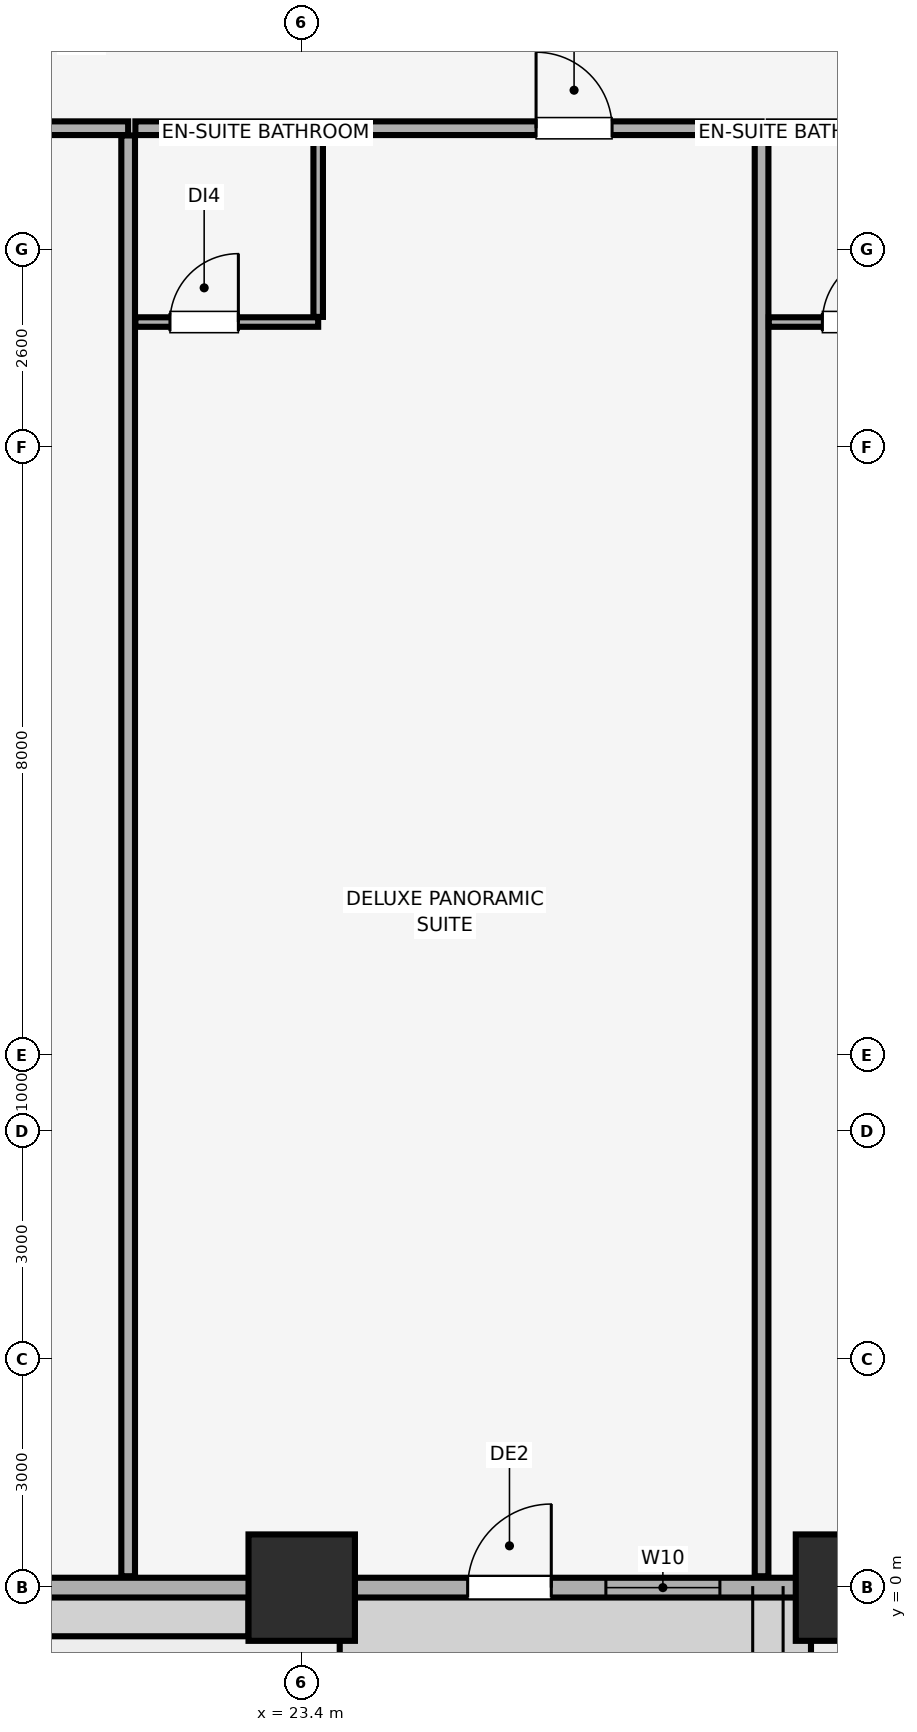
"""IFC4 building model, lengths in metres.
Left out: names, types, materials, properties, quantities, classifications, styles, units other than length and angle.
Written with IfcOpenShell. Run it as: python <this file> out.ifc"""

import sys

from ifc_helpers import new_model, si_unit, direction, frame, frame_2d, origin, origin_2d, place, context, subcontext, project, spatial, rectangle, extrude, element, fill, save


model = new_model("IFC4")
c1 = context("Model", 3, precision=1e-05, world=origin(), true_north=direction((0.0, 1.0)))
c2 = subcontext(c1, "Body", "Model", "MODEL_VIEW")
j1 = project(units=[si_unit("LENGTHUNIT", "METRE"), si_unit("PLANEANGLEUNIT", "RADIAN")], contexts=[c1])
p1 = place(None, origin())
s1 = spatial("IfcSite", under=j1, at=p1, CompositionType="ELEMENT")
p2 = place(p1, origin())
s2 = spatial("IfcBuilding", under=s1, at=p2, CompositionType="ELEMENT")
p3 = place(p2, frame((0.0, 0.0, 76.4)))
s3 = spatial("IfcBuildingStorey", under=s2, at=p3, CompositionType="ELEMENT", Elevation=76.4)
for number, where, z_axis, x_axis in (
    (1, (23.4, 0.0, 0.0), (0.0, 0.0, 1.0), (1.0, 0.0, 0.0)),
    (2, (30.6, 0.0, 0.0), (0.0, 0.0, 1.0), (1.0, 0.0, 0.0)),
):
    element("IfcColumn", number, at=place(p3, frame(where, z_axis=z_axis, x_axis=x_axis)), inside=s3, PredefinedType="COLUMN", context=c2, shape_type="SweptSolid", body=[
        extrude(rectangle(XDim=1.4, YDim=1.4, at=origin_2d()), origin(), (0.0, 0.0, 1.0), 3.4),
    ])
p4 = place(p3, frame((4.2, 0.0, 0.0), z_axis=(0.0, 0.0, 1.0), x_axis=(1.0, 0.0, 0.0)))
e3 = element("IfcWall", 3, at=p4, inside=s3, PredefinedType="SOLIDWALL", context=c2, shape_type="SweptSolid", body=[
    extrude(rectangle(XDim=75.6, YDim=0.26, at=frame_2d((37.8, 0.0))), origin(), (0.0, 0.0, 1.0), 2.45),
])
p5 = place(p4, frame((21.383, 0.0, 0.0)))
e4 = element("IfcOpeningElement", 4, at=p5, cuts=e3, PredefinedType="OPENING", context=c2, shape_type="SweptSolid", body=[
    extrude(rectangle(XDim=1.1, YDim=2.15, at=frame_2d((0.55, 1.075))), frame((0.0, 0.14, 0.0), z_axis=(0.0, -1.0, 0.0), x_axis=(1.0, 0.0, 0.0)), (0.0, 0.0, 1.0), 0.28),
])
p6 = place(p4, frame((37.25, 0.0, 0.0)))
e5 = element("IfcOpeningElement", 5, at=p6, cuts=e3, PredefinedType="OPENING", context=c2, shape_type="SweptSolid", body=[
    extrude(rectangle(XDim=1.1, YDim=2.15, at=frame_2d((0.55, 1.075))), frame((0.0, 0.14, 0.0), z_axis=(0.0, -1.0, 0.0), x_axis=(1.0, 0.0, 0.0)), (0.0, 0.0, 1.0), 0.28),
])
p7 = place(p4, frame((53.117, 0.0, 0.0)))
e6 = element("IfcOpeningElement", 6, at=p7, cuts=e3, PredefinedType="OPENING", context=c2, shape_type="SweptSolid", body=[
    extrude(rectangle(XDim=1.1, YDim=2.15, at=frame_2d((0.55, 1.075))), frame((0.0, 0.14, 0.0), z_axis=(0.0, -1.0, 0.0), x_axis=(1.0, 0.0, 0.0)), (0.0, 0.0, 1.0), 0.28),
])
p8 = place(p4, frame((1.485, 0.0, 0.85)))
e7 = element("IfcOpeningElement", 7, at=p8, cuts=e3, PredefinedType="OPENING", context=c2, shape_type="SweptSolid", body=[
    extrude(rectangle(XDim=1.5, YDim=1.4, at=frame_2d((0.75, 0.7))), frame((0.0, 0.14, 0.0), z_axis=(0.0, -1.0, 0.0), x_axis=(1.0, 0.0, 0.0)), (0.0, 0.0, 1.0), 0.28),
])
p9 = place(p4, frame((6.142, 0.0, 0.85)))
e8 = element("IfcOpeningElement", 8, at=p9, cuts=e3, PredefinedType="OPENING", context=c2, shape_type="SweptSolid", body=[
    extrude(rectangle(XDim=1.5, YDim=1.4, at=frame_2d((0.75, 0.7))), frame((0.0, 0.14, 0.0), z_axis=(0.0, -1.0, 0.0), x_axis=(1.0, 0.0, 0.0)), (0.0, 0.0, 1.0), 0.28),
])
p10 = place(p4, frame((9.342, 0.0, 0.85)))
e9 = element("IfcOpeningElement", 9, at=p10, cuts=e3, PredefinedType="OPENING", context=c2, shape_type="SweptSolid", body=[
    extrude(rectangle(XDim=1.5, YDim=1.4, at=frame_2d((0.75, 0.7))), frame((0.0, 0.14, 0.0), z_axis=(0.0, -1.0, 0.0), x_axis=(1.0, 0.0, 0.0)), (0.0, 0.0, 1.0), 0.28),
])
p11 = place(p4, frame((13.908, 0.0, 0.85)))
e10 = element("IfcOpeningElement", 10, at=p11, cuts=e3, PredefinedType="OPENING", context=c2, shape_type="SweptSolid", body=[
    extrude(rectangle(XDim=1.5, YDim=1.4, at=frame_2d((0.75, 0.7))), frame((0.0, 0.14, 0.0), z_axis=(0.0, -1.0, 0.0), x_axis=(1.0, 0.0, 0.0)), (0.0, 0.0, 1.0), 0.28),
])
p12 = place(p4, frame((23.202, 0.0, 0.85)))
e11 = element("IfcOpeningElement", 11, at=p12, cuts=e3, PredefinedType="OPENING", context=c2, shape_type="SweptSolid", body=[
    extrude(rectangle(XDim=1.5, YDim=1.4, at=frame_2d((0.75, 0.7))), frame((0.0, 0.14, 0.0), z_axis=(0.0, -1.0, 0.0), x_axis=(1.0, 0.0, 0.0)), (0.0, 0.0, 1.0), 0.28),
])
p13 = place(p4, frame((29.25, 0.0, 0.85)))
e12 = element("IfcOpeningElement", 12, at=p13, cuts=e3, PredefinedType="OPENING", context=c2, shape_type="SweptSolid", body=[
    extrude(rectangle(XDim=1.5, YDim=1.4, at=frame_2d((0.75, 0.7))), frame((0.0, 0.14, 0.0), z_axis=(0.0, -1.0, 0.0), x_axis=(1.0, 0.0, 0.0)), (0.0, 0.0, 1.0), 0.28),
])
p14 = place(p4, frame((34.79, 0.0, 0.85)))
e13 = element("IfcOpeningElement", 13, at=p14, cuts=e3, PredefinedType="OPENING", context=c2, shape_type="SweptSolid", body=[
    extrude(rectangle(XDim=1.5, YDim=1.4, at=frame_2d((0.75, 0.7))), frame((0.0, 0.14, 0.0), z_axis=(0.0, -1.0, 0.0), x_axis=(1.0, 0.0, 0.0)), (0.0, 0.0, 1.0), 0.28),
])
p15 = place(p4, frame((39.31, 0.0, 0.85)))
e14 = element("IfcOpeningElement", 14, at=p15, cuts=e3, PredefinedType="OPENING", context=c2, shape_type="SweptSolid", body=[
    extrude(rectangle(XDim=1.5, YDim=1.4, at=frame_2d((0.75, 0.7))), frame((0.0, 0.14, 0.0), z_axis=(0.0, -1.0, 0.0), x_axis=(1.0, 0.0, 0.0)), (0.0, 0.0, 1.0), 0.28),
])
p16 = place(p4, frame((44.85, 0.0, 0.85)))
e15 = element("IfcOpeningElement", 15, at=p16, cuts=e3, PredefinedType="OPENING", context=c2, shape_type="SweptSolid", body=[
    extrude(rectangle(XDim=1.5, YDim=1.4, at=frame_2d((0.75, 0.7))), frame((0.0, 0.14, 0.0), z_axis=(0.0, -1.0, 0.0), x_axis=(1.0, 0.0, 0.0)), (0.0, 0.0, 1.0), 0.28),
])
p17 = place(p4, frame((50.848, 0.0, 0.85)))
e16 = element("IfcOpeningElement", 16, at=p17, cuts=e3, PredefinedType="OPENING", context=c2, shape_type="SweptSolid", body=[
    extrude(rectangle(XDim=1.5, YDim=1.4, at=frame_2d((0.75, 0.7))), frame((0.0, 0.14, 0.0), z_axis=(0.0, -1.0, 0.0), x_axis=(1.0, 0.0, 0.0)), (0.0, 0.0, 1.0), 0.28),
])
p18 = place(p4, frame((60.142, 0.0, 0.85)))
e17 = element("IfcOpeningElement", 17, at=p18, cuts=e3, PredefinedType="OPENING", context=c2, shape_type="SweptSolid", body=[
    extrude(rectangle(XDim=1.5, YDim=1.4, at=frame_2d((0.75, 0.7))), frame((0.0, 0.14, 0.0), z_axis=(0.0, -1.0, 0.0), x_axis=(1.0, 0.0, 0.0)), (0.0, 0.0, 1.0), 0.28),
])
p19 = place(p4, frame((64.708, 0.0, 0.85)))
e18 = element("IfcOpeningElement", 18, at=p19, cuts=e3, PredefinedType="OPENING", context=c2, shape_type="SweptSolid", body=[
    extrude(rectangle(XDim=1.5, YDim=1.4, at=frame_2d((0.75, 0.7))), frame((0.0, 0.14, 0.0), z_axis=(0.0, -1.0, 0.0), x_axis=(1.0, 0.0, 0.0)), (0.0, 0.0, 1.0), 0.28),
])
p20 = place(p4, frame((67.908, 0.0, 0.85)))
e19 = element("IfcOpeningElement", 19, at=p20, cuts=e3, PredefinedType="OPENING", context=c2, shape_type="SweptSolid", body=[
    extrude(rectangle(XDim=1.5, YDim=1.4, at=frame_2d((0.75, 0.7))), frame((0.0, 0.14, 0.0), z_axis=(0.0, -1.0, 0.0), x_axis=(1.0, 0.0, 0.0)), (0.0, 0.0, 1.0), 0.28),
])
p21 = place(p4, frame((72.615, 0.0, 0.85)))
e20 = element("IfcOpeningElement", 20, at=p21, cuts=e3, PredefinedType="OPENING", context=c2, shape_type="SweptSolid", body=[
    extrude(rectangle(XDim=1.5, YDim=1.4, at=frame_2d((0.75, 0.7))), frame((0.0, 0.14, 0.0), z_axis=(0.0, -1.0, 0.0), x_axis=(1.0, 0.0, 0.0)), (0.0, 0.0, 1.0), 0.28),
])
p22 = place(p3, frame((12.878, 19.2, 0.0), z_axis=(0.0, 0.0, 1.0), x_axis=(1.0, 0.0, 0.0)))
e21 = element("IfcWall", 21, at=p22, inside=s3, PredefinedType="PARTITIONING", context=c2, shape_type="SweptSolid", body=[
    extrude(rectangle(XDim=8.238, YDim=0.18, at=frame_2d((4.119, 0.0))), origin(), (0.0, 0.0, 1.0), 3.4),
])
p23 = place(p22, frame((5.67, 0.0, 0.0)))
e22 = element("IfcOpeningElement", 22, at=p23, cuts=e21, PredefinedType="OPENING", context=c2, shape_type="SweptSolid", body=[
    extrude(rectangle(XDim=1.0, YDim=2.15, at=frame_2d((0.5, 1.075))), frame((0.0, 0.1, 0.0), z_axis=(0.0, -1.0, 0.0), x_axis=(1.0, 0.0, 0.0)), (0.0, 0.0, 1.0), 0.2),
])
p24 = place(p3, frame((21.117, 0.15, 0.0), z_axis=(0.0, 0.0, 1.0), x_axis=(0.0, 1.0, 0.0)))
e23 = element("IfcWall", 23, at=p24, inside=s3, PredefinedType="PARTITIONING", context=c2, shape_type="SweptSolid", body=[
    extrude(rectangle(XDim=18.955, YDim=0.18, at=frame_2d((9.478, 0.0))), origin(), (0.0, 0.0, 1.0), 3.4),
])
p25 = place(p3, frame((21.212, 19.2, 0.0), z_axis=(0.0, 0.0, 1.0), x_axis=(1.0, 0.0, 0.0)))
e24 = element("IfcWall", 24, at=p25, inside=s3, PredefinedType="PARTITIONING", context=c2, shape_type="SweptSolid", body=[
    extrude(rectangle(XDim=8.238, YDim=0.18, at=frame_2d((4.119, 0.0))), origin(), (0.0, 0.0, 1.0), 3.4),
])
p26 = place(p25, frame((5.271, 0.0, 0.0)))
e25 = element("IfcOpeningElement", 25, at=p26, cuts=e24, PredefinedType="OPENING", context=c2, shape_type="SweptSolid", body=[
    extrude(rectangle(XDim=1.0, YDim=2.15, at=frame_2d((0.5, 1.075))), frame((0.0, 0.1, 0.0), z_axis=(0.0, -1.0, 0.0), x_axis=(1.0, 0.0, 0.0)), (0.0, 0.0, 1.0), 0.2),
])
p27 = place(p3, frame((29.45, 0.15, 0.0), z_axis=(0.0, 0.0, 1.0), x_axis=(0.0, 1.0, 0.0)))
e26 = element("IfcWall", 26, at=p27, inside=s3, PredefinedType="PARTITIONING", context=c2, shape_type="SweptSolid", body=[
    extrude(rectangle(XDim=18.955, YDim=0.18, at=frame_2d((9.478, 0.0))), origin(), (0.0, 0.0, 1.0), 3.4),
])
p28 = place(p3, frame((21.212, 16.65, 0.0), z_axis=(0.0, 0.0, 1.0), x_axis=(1.0, 0.0, 0.0)))
e27 = element("IfcWall", 27, at=p28, inside=s3, PredefinedType="PARTITIONING", context=c2, shape_type="SweptSolid", body=[
    extrude(rectangle(XDim=2.405, YDim=0.125, at=frame_2d((1.203, 0.0))), origin(), (0.0, 0.0, 1.0), 3.4),
])
p29 = place(p28, frame((0.455, 0.0, 0.0)))
e28 = element("IfcOpeningElement", 28, at=p29, cuts=e27, PredefinedType="OPENING", context=c2, shape_type="SweptSolid", body=[
    extrude(rectangle(XDim=0.9, YDim=2.1, at=frame_2d((0.45, 1.05))), frame((0.0, 0.073, 0.0), z_axis=(0.0, -1.0, 0.0), x_axis=(1.0, 0.0, 0.0)), (0.0, 0.0, 1.0), 0.145),
])
p30 = place(p3, frame((23.617, 16.718, 0.0), z_axis=(0.0, 0.0, 1.0), x_axis=(0.0, 1.0, 0.0)))
e29 = element("IfcWall", 29, at=p30, inside=s3, PredefinedType="PARTITIONING", context=c2, shape_type="SweptSolid", body=[
    extrude(rectangle(XDim=2.387, YDim=0.125, at=frame_2d((1.194, 0.0))), origin(), (0.0, 0.0, 1.0), 2.9),
])
p31 = place(p3, frame((29.545, 19.2, 0.0), z_axis=(0.0, 0.0, 1.0), x_axis=(1.0, 0.0, 0.0)))
e30 = element("IfcWall", 30, at=p31, inside=s3, PredefinedType="PARTITIONING", context=c2, shape_type="SweptSolid", body=[
    extrude(rectangle(XDim=8.238, YDim=0.18, at=frame_2d((4.119, 0.0))), origin(), (0.0, 0.0, 1.0), 3.4),
])
p32 = place(p31, frame((4.89, 0.0, 0.0)))
e31 = element("IfcOpeningElement", 31, at=p32, cuts=e30, PredefinedType="OPENING", context=c2, shape_type="SweptSolid", body=[
    extrude(rectangle(XDim=1.0, YDim=2.15, at=frame_2d((0.5, 1.075))), frame((0.0, 0.1, 0.0), z_axis=(0.0, -1.0, 0.0), x_axis=(1.0, 0.0, 0.0)), (0.0, 0.0, 1.0), 0.2),
])
p33 = place(p3, frame((29.545, 16.65, 0.0), z_axis=(0.0, 0.0, 1.0), x_axis=(1.0, 0.0, 0.0)))
e32 = element("IfcWall", 32, at=p33, inside=s3, PredefinedType="PARTITIONING", context=c2, shape_type="SweptSolid", body=[
    extrude(rectangle(XDim=2.405, YDim=0.125, at=frame_2d((1.203, 0.0))), origin(), (0.0, 0.0, 1.0), 3.4),
])
p34 = place(p33, frame((0.705, 0.0, 0.0)))
e33 = element("IfcOpeningElement", 33, at=p34, cuts=e32, PredefinedType="OPENING", context=c2, shape_type="SweptSolid", body=[
    extrude(rectangle(XDim=0.9, YDim=2.1, at=frame_2d((0.45, 1.05))), frame((0.0, 0.073, 0.0), z_axis=(0.0, -1.0, 0.0), x_axis=(1.0, 0.0, 0.0)), (0.0, 0.0, 1.0), 0.145),
])
p35 = place(p5, origin())
e34 = element("IfcDoor", 34, at=p35, inside=s3, OperationType="SINGLE_SWING_RIGHT", PredefinedType="DOOR", context=c2, shape_type="SweptSolid", body=[
    extrude(rectangle(XDim=1.1, YDim=2.15, at=frame_2d((0.55, 1.075))), frame((0.0, 0.025, 0.0), z_axis=(0.0, -1.0, 0.0), x_axis=(1.0, 0.0, 0.0)), (0.0, 0.0, 1.0), 0.05),
])
fill(e4, e34)
p36 = place(p12, origin())
e35 = element("IfcWindow", 35, at=p36, inside=s3, PartitioningType="SINGLE_PANEL", PredefinedType="WINDOW", context=c2, shape_type="SweptSolid", body=[
    extrude(rectangle(XDim=1.5, YDim=1.4, at=frame_2d((0.75, 0.7))), frame((0.0, 0.03, 0.0), z_axis=(0.0, -1.0, 0.0), x_axis=(1.0, 0.0, 0.0)), (0.0, 0.0, 1.0), 0.06),
])
fill(e11, e35)
p37 = place(p26, origin())
e36 = element("IfcDoor", 36, at=p37, inside=s3, OperationType="SINGLE_SWING_LEFT", PredefinedType="DOOR", context=c2, shape_type="SweptSolid", body=[
    extrude(rectangle(XDim=1.0, YDim=2.15, at=frame_2d((0.5, 1.075))), frame((0.0, 0.025, 0.0), z_axis=(0.0, -1.0, 0.0), x_axis=(1.0, 0.0, 0.0)), (0.0, 0.0, 1.0), 0.05),
])
fill(e25, e36)
p38 = place(p29, origin())
e37 = element("IfcDoor", 37, at=p38, inside=s3, OperationType="SINGLE_SWING_RIGHT", PredefinedType="DOOR", context=c2, shape_type="SweptSolid", body=[
    extrude(rectangle(XDim=0.9, YDim=2.1, at=frame_2d((0.45, 1.05))), frame((0.0, 0.025, 0.0), z_axis=(0.0, -1.0, 0.0), x_axis=(1.0, 0.0, 0.0)), (0.0, 0.0, 1.0), 0.05),
])
fill(e28, e37)
p39 = place(p34, origin())
e38 = element("IfcDoor", 38, at=p39, inside=s3, OperationType="SINGLE_SWING_RIGHT", PredefinedType="DOOR", context=c2, shape_type="SweptSolid", body=[
    extrude(rectangle(XDim=0.9, YDim=2.1, at=frame_2d((0.45, 1.05))), frame((0.0, 0.025, 0.0), z_axis=(0.0, -1.0, 0.0), x_axis=(1.0, 0.0, 0.0)), (0.0, 0.0, 1.0), 0.05),
])
fill(e33, e38)
save(model, sys.argv[1])
